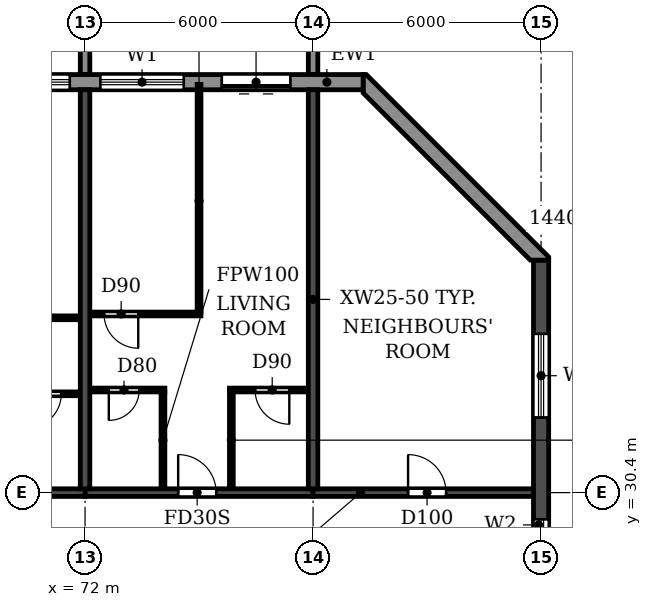
"""IFC4 building model, lengths in metres.
Left out: names, types, materials, properties, quantities, classifications, styles, units other than length and angle.
Written with IfcOpenShell. Run it as: python <this file> out.ifc"""

import sys

from ifc_helpers import new_model, si_unit, direction, frame, frame_2d, origin, place, context, subcontext, project, spatial, polyline, rectangle, outline, extrude, source, transform, mapped, element, fill, save


model = new_model("IFC4")
c1 = context("Model", 3, precision=1e-05, world=origin(), true_north=direction((0.0, 1.0)))
c2 = subcontext(c1, "Body", "Model", "MODEL_VIEW")
j1 = project(units=[si_unit("LENGTHUNIT", "METRE"), si_unit("PLANEANGLEUNIT", "RADIAN")], contexts=[c1])
p1 = place(None, origin())
s1 = spatial("IfcSite", under=j1, at=p1, CompositionType="ELEMENT")
p2 = place(p1, origin())
s2 = spatial("IfcBuilding", under=s1, at=p2, CompositionType="ELEMENT")
p3 = place(p2, frame((0.0, 0.0, 175.2)))
s3 = spatial("IfcBuildingStorey", under=s2, at=p3, CompositionType="ELEMENT", Elevation=175.2)
for number, where, z_axis, x_axis in (
    (1, (72.0, 30.5, 0.0), (0.0, 0.0, 1.0), (0.0, 1.0, 0.0)),
    (2, (78.0, 30.5, 0.0), (0.0, 0.0, 1.0), (0.0, 1.0, 0.0)),
):
    element("IfcWall", number, at=place(p3, frame(where, z_axis=z_axis, x_axis=x_axis)), inside=s3, PredefinedType="SHEAR", context=c2, shape_type="SweptSolid", body=[
        extrude(rectangle(XDim=10.5, YDim=0.25, at=frame_2d((5.25, 0.0))), origin(), (0.0, 0.0, 1.0), 3.08),
    ])
p4 = place(p3, frame((84.0, 4.683, 0.0), z_axis=(0.0, 0.0, 1.0), x_axis=(0.0, 1.0, 0.0)))
e3 = element("IfcWall", 3, at=p4, inside=s3, PredefinedType="SHEAR", context=c2, shape_type="SweptSolid", body=[
    extrude(rectangle(XDim=31.834, YDim=0.4, at=frame_2d((15.917, 0.0))), origin(), (0.0, 0.0, 1.0), 3.08),
])
p5 = place(p4, frame((23.817, 0.0, 0.9)))
e4 = element("IfcOpeningElement", 4, at=p5, cuts=e3, PredefinedType="OPENING", context=c2, shape_type="SweptSolid", body=[
    extrude(rectangle(XDim=1.2, YDim=1.5, at=frame_2d((0.6, 0.75))), frame((0.0, 0.21, 0.0), z_axis=(0.0, -1.0, 0.0), x_axis=(1.0, 0.0, 0.0)), (0.0, 0.0, 1.0), 0.42),
])
p6 = place(p4, frame((8.017, 0.0, 0.9)))
e5 = element("IfcOpeningElement", 5, at=p6, cuts=e3, PredefinedType="OPENING", context=c2, shape_type="SweptSolid", body=[
    extrude(rectangle(XDim=1.2, YDim=1.5, at=frame_2d((0.6, 0.75))), frame((0.0, 0.21, 0.0), z_axis=(0.0, -1.0, 0.0), x_axis=(1.0, 0.0, 0.0)), (0.0, 0.0, 1.0), 0.42),
])
p7 = place(p4, frame((27.694, 0.0, 0.6)))
e6 = element("IfcOpeningElement", 6, at=p7, cuts=e3, PredefinedType="OPENING", context=c2, shape_type="SweptSolid", body=[
    extrude(rectangle(XDim=2.2, YDim=1.8, at=frame_2d((1.1, 0.9))), frame((0.0, 0.21, 0.0), z_axis=(0.0, -1.0, 0.0), x_axis=(1.0, 0.0, 0.0)), (0.0, 0.0, 1.0), 0.42),
])
p8 = place(p4, frame((2.541, 0.0, 0.6)))
e7 = element("IfcOpeningElement", 7, at=p8, cuts=e3, PredefinedType="OPENING", context=c2, shape_type="SweptSolid", body=[
    extrude(rectangle(XDim=2.2, YDim=1.8, at=frame_2d((1.1, 0.9))), frame((0.0, 0.21, 0.0), z_axis=(0.0, -1.0, 0.0), x_axis=(1.0, 0.0, 0.0)), (0.0, 0.0, 1.0), 0.42),
])
p9 = place(p4, frame((15.917, 0.0, 0.9)))
e8 = element("IfcOpeningElement", 8, at=p9, cuts=e3, PredefinedType="OPENING", context=c2, shape_type="SweptSolid", body=[
    extrude(rectangle(XDim=1.2, YDim=1.5, at=frame_2d((0.6, 0.75))), frame((0.0, 0.21, 0.0), z_axis=(0.0, -1.0, 0.0), x_axis=(1.0, 0.0, 0.0)), (0.0, 0.0, 1.0), 0.42),
])
p10 = place(p3, frame((66.0, 30.4, 0.0), z_axis=(0.0, 0.0, 1.0), x_axis=(1.0, 0.0, 0.0)))
e9 = element("IfcWall", 9, at=p10, inside=s3, PredefinedType="SHEAR", context=c2, shape_type="SweptSolid", body=[
    extrude(rectangle(XDim=6.0, YDim=0.2, at=frame_2d((3.0, 0.0))), origin(), (0.0, 0.0, 1.0), 2.48),
])
p11 = place(p10, frame((2.45, 0.0, 0.0)))
e10 = element("IfcOpeningElement", 10, at=p11, cuts=e9, PredefinedType="OPENING", context=c2, shape_type="SweptSolid", body=[
    extrude(rectangle(XDim=1.0, YDim=2.1, at=frame_2d((0.5, 1.05))), frame((0.0, 0.11, 0.0), z_axis=(0.0, -1.0, 0.0), x_axis=(1.0, 0.0, 0.0)), (0.0, 0.0, 1.0), 0.22),
])
p12 = place(p3, frame((72.0, 30.4, 0.0), z_axis=(0.0, 0.0, 1.0), x_axis=(1.0, 0.0, 0.0)))
e11 = element("IfcWall", 11, at=p12, inside=s3, PredefinedType="SHEAR", context=c2, shape_type="SweptSolid", body=[
    extrude(rectangle(XDim=6.0, YDim=0.2, at=frame_2d((3.0, 0.0))), origin(), (0.0, 0.0, 1.0), 2.48),
])
p13 = place(p12, frame((2.45, 0.0, 0.0)))
e12 = element("IfcOpeningElement", 12, at=p13, cuts=e11, PredefinedType="OPENING", context=c2, shape_type="SweptSolid", body=[
    extrude(rectangle(XDim=1.0, YDim=2.1, at=frame_2d((0.5, 1.05))), frame((0.0, 0.11, 0.0), z_axis=(0.0, -1.0, 0.0), x_axis=(1.0, 0.0, 0.0)), (0.0, 0.0, 1.0), 0.22),
])
p14 = place(p3, frame((78.0, 30.4, 0.0), z_axis=(0.0, 0.0, 1.0), x_axis=(1.0, 0.0, 0.0)))
e13 = element("IfcWall", 13, at=p14, inside=s3, PredefinedType="SHEAR", context=c2, shape_type="SweptSolid", body=[
    extrude(rectangle(XDim=5.8, YDim=0.2, at=frame_2d((2.9, 0.0))), origin(), (0.0, 0.0, 1.0), 2.48),
])
p15 = place(p14, frame((2.5, 0.0, 0.0)))
e14 = element("IfcOpeningElement", 14, at=p15, cuts=e13, PredefinedType="OPENING", context=c2, shape_type="SweptSolid", body=[
    extrude(rectangle(XDim=1.0, YDim=2.1, at=frame_2d((0.5, 1.05))), frame((0.0, 0.11, 0.0), z_axis=(0.0, -1.0, 0.0), x_axis=(1.0, 0.0, 0.0)), (0.0, 0.0, 1.0), 0.22),
])
p16 = place(p3, origin())
e15 = element("IfcWall", 15, at=p16, inside=s3, PredefinedType="STANDARD", context=c2, shape_type="SweptSolid", body=[
    extrude(outline(polyline([(84.2, 36.517), (84.2, 36.6), (79.4, 41.4), (79.317, 41.4), (79.317, 40.917), (83.717, 36.517), (84.2, 36.517)])), origin(), (0.0, 0.0, 1.0), 3.08),
])
p17 = place(p3, frame((79.317, 41.2, 0.0), z_axis=(0.0, 0.0, 1.0), x_axis=(-1.0, 0.0, 0.0)))
e16 = element("IfcWall", 16, at=p17, inside=s3, PredefinedType="STANDARD", context=c2, shape_type="SweptSolid", body=[
    extrude(rectangle(XDim=56.634, YDim=0.4, at=frame_2d((28.317, 0.0))), origin(), (0.0, 0.0, 1.0), 3.08),
])
p18 = place(p17, frame((52.717, 0.0, 0.9)))
e17 = element("IfcOpeningElement", 17, at=p18, cuts=e16, PredefinedType="OPENING", context=c2, shape_type="SweptSolid", body=[
    extrude(rectangle(XDim=2.2, YDim=1.5, at=frame_2d((1.1, 0.75))), frame((0.0, 0.21, 0.0), z_axis=(0.0, -1.0, 0.0), x_axis=(1.0, 0.0, 0.0)), (0.0, 0.0, 1.0), 0.42),
])
p19 = place(p17, frame((49.917, 0.0, 0.0)))
e18 = element("IfcOpeningElement", 18, at=p19, cuts=e16, PredefinedType="OPENING", context=c2, shape_type="SweptSolid", body=[
    extrude(rectangle(XDim=1.8, YDim=2.4, at=frame_2d((0.9, 1.2))), frame((0.0, 0.21, 0.0), z_axis=(0.0, -1.0, 0.0), x_axis=(1.0, 0.0, 0.0)), (0.0, 0.0, 1.0), 0.42),
])
p20 = place(p17, frame((46.717, 0.0, 0.9)))
e19 = element("IfcOpeningElement", 19, at=p20, cuts=e16, PredefinedType="OPENING", context=c2, shape_type="SweptSolid", body=[
    extrude(rectangle(XDim=2.2, YDim=1.5, at=frame_2d((1.1, 0.75))), frame((0.0, 0.21, 0.0), z_axis=(0.0, -1.0, 0.0), x_axis=(1.0, 0.0, 0.0)), (0.0, 0.0, 1.0), 0.42),
])
p21 = place(p17, frame((43.717, 0.0, 0.9)))
e20 = element("IfcOpeningElement", 20, at=p21, cuts=e16, PredefinedType="OPENING", context=c2, shape_type="SweptSolid", body=[
    extrude(rectangle(XDim=2.2, YDim=1.5, at=frame_2d((1.1, 0.75))), frame((0.0, 0.21, 0.0), z_axis=(0.0, -1.0, 0.0), x_axis=(1.0, 0.0, 0.0)), (0.0, 0.0, 1.0), 0.42),
])
p22 = place(p17, frame((40.917, 0.0, 0.0)))
e21 = element("IfcOpeningElement", 21, at=p22, cuts=e16, PredefinedType="OPENING", context=c2, shape_type="SweptSolid", body=[
    extrude(rectangle(XDim=1.8, YDim=2.4, at=frame_2d((0.9, 1.2))), frame((0.0, 0.21, 0.0), z_axis=(0.0, -1.0, 0.0), x_axis=(1.0, 0.0, 0.0)), (0.0, 0.0, 1.0), 0.42),
])
p23 = place(p17, frame((37.717, 0.0, 0.9)))
e22 = element("IfcOpeningElement", 22, at=p23, cuts=e16, PredefinedType="OPENING", context=c2, shape_type="SweptSolid", body=[
    extrude(rectangle(XDim=2.2, YDim=1.5, at=frame_2d((1.1, 0.75))), frame((0.0, 0.21, 0.0), z_axis=(0.0, -1.0, 0.0), x_axis=(1.0, 0.0, 0.0)), (0.0, 0.0, 1.0), 0.42),
])
p24 = place(p17, frame((34.717, 0.0, 0.9)))
e23 = element("IfcOpeningElement", 23, at=p24, cuts=e16, PredefinedType="OPENING", context=c2, shape_type="SweptSolid", body=[
    extrude(rectangle(XDim=2.2, YDim=1.5, at=frame_2d((1.1, 0.75))), frame((0.0, 0.21, 0.0), z_axis=(0.0, -1.0, 0.0), x_axis=(1.0, 0.0, 0.0)), (0.0, 0.0, 1.0), 0.42),
])
p25 = place(p17, frame((31.717, 0.0, 0.9)))
e24 = element("IfcOpeningElement", 24, at=p25, cuts=e16, PredefinedType="OPENING", context=c2, shape_type="SweptSolid", body=[
    extrude(rectangle(XDim=2.2, YDim=1.5, at=frame_2d((1.1, 0.75))), frame((0.0, 0.21, 0.0), z_axis=(0.0, -1.0, 0.0), x_axis=(1.0, 0.0, 0.0)), (0.0, 0.0, 1.0), 0.42),
])
p26 = place(p17, frame((28.717, 0.0, 0.9)))
e25 = element("IfcOpeningElement", 25, at=p26, cuts=e16, PredefinedType="OPENING", context=c2, shape_type="SweptSolid", body=[
    extrude(rectangle(XDim=2.2, YDim=1.5, at=frame_2d((1.1, 0.75))), frame((0.0, 0.21, 0.0), z_axis=(0.0, -1.0, 0.0), x_axis=(1.0, 0.0, 0.0)), (0.0, 0.0, 1.0), 0.42),
])
p27 = place(p17, frame((25.917, 0.0, 0.0)))
e26 = element("IfcOpeningElement", 26, at=p27, cuts=e16, PredefinedType="OPENING", context=c2, shape_type="SweptSolid", body=[
    extrude(rectangle(XDim=1.8, YDim=2.4, at=frame_2d((0.9, 1.2))), frame((0.0, 0.21, 0.0), z_axis=(0.0, -1.0, 0.0), x_axis=(1.0, 0.0, 0.0)), (0.0, 0.0, 1.0), 0.42),
])
p28 = place(p17, frame((22.717, 0.0, 0.9)))
e27 = element("IfcOpeningElement", 27, at=p28, cuts=e16, PredefinedType="OPENING", context=c2, shape_type="SweptSolid", body=[
    extrude(rectangle(XDim=2.2, YDim=1.5, at=frame_2d((1.1, 0.75))), frame((0.0, 0.21, 0.0), z_axis=(0.0, -1.0, 0.0), x_axis=(1.0, 0.0, 0.0)), (0.0, 0.0, 1.0), 0.42),
])
p29 = place(p17, frame((19.917, 0.0, 0.0)))
e28 = element("IfcOpeningElement", 28, at=p29, cuts=e16, PredefinedType="OPENING", context=c2, shape_type="SweptSolid", body=[
    extrude(rectangle(XDim=1.8, YDim=2.4, at=frame_2d((0.9, 1.2))), frame((0.0, 0.21, 0.0), z_axis=(0.0, -1.0, 0.0), x_axis=(1.0, 0.0, 0.0)), (0.0, 0.0, 1.0), 0.42),
])
p30 = place(p17, frame((16.717, 0.0, 0.9)))
e29 = element("IfcOpeningElement", 29, at=p30, cuts=e16, PredefinedType="OPENING", context=c2, shape_type="SweptSolid", body=[
    extrude(rectangle(XDim=2.2, YDim=1.5, at=frame_2d((1.1, 0.75))), frame((0.0, 0.21, 0.0), z_axis=(0.0, -1.0, 0.0), x_axis=(1.0, 0.0, 0.0)), (0.0, 0.0, 1.0), 0.42),
])
p31 = place(p17, frame((13.717, 0.0, 0.9)))
e30 = element("IfcOpeningElement", 30, at=p31, cuts=e16, PredefinedType="OPENING", context=c2, shape_type="SweptSolid", body=[
    extrude(rectangle(XDim=2.2, YDim=1.5, at=frame_2d((1.1, 0.75))), frame((0.0, 0.21, 0.0), z_axis=(0.0, -1.0, 0.0), x_axis=(1.0, 0.0, 0.0)), (0.0, 0.0, 1.0), 0.42),
])
p32 = place(p17, frame((10.917, 0.0, 0.0)))
e31 = element("IfcOpeningElement", 31, at=p32, cuts=e16, PredefinedType="OPENING", context=c2, shape_type="SweptSolid", body=[
    extrude(rectangle(XDim=1.8, YDim=2.4, at=frame_2d((0.9, 1.2))), frame((0.0, 0.21, 0.0), z_axis=(0.0, -1.0, 0.0), x_axis=(1.0, 0.0, 0.0)), (0.0, 0.0, 1.0), 0.42),
])
p33 = place(p17, frame((7.717, 0.0, 0.9)))
e32 = element("IfcOpeningElement", 32, at=p33, cuts=e16, PredefinedType="OPENING", context=c2, shape_type="SweptSolid", body=[
    extrude(rectangle(XDim=2.2, YDim=1.5, at=frame_2d((1.1, 0.75))), frame((0.0, 0.21, 0.0), z_axis=(0.0, -1.0, 0.0), x_axis=(1.0, 0.0, 0.0)), (0.0, 0.0, 1.0), 0.42),
])
p34 = place(p17, frame((4.717, 0.0, 0.9)))
e33 = element("IfcOpeningElement", 33, at=p34, cuts=e16, PredefinedType="OPENING", context=c2, shape_type="SweptSolid", body=[
    extrude(rectangle(XDim=2.2, YDim=1.5, at=frame_2d((1.1, 0.75))), frame((0.0, 0.21, 0.0), z_axis=(0.0, -1.0, 0.0), x_axis=(1.0, 0.0, 0.0)), (0.0, 0.0, 1.0), 0.42),
])
p35 = place(p17, frame((1.917, 0.0, 0.0)))
e34 = element("IfcOpeningElement", 34, at=p35, cuts=e16, PredefinedType="OPENING", context=c2, shape_type="SweptSolid", body=[
    extrude(rectangle(XDim=1.8, YDim=2.4, at=frame_2d((0.9, 1.2))), frame((0.0, 0.21, 0.0), z_axis=(0.0, -1.0, 0.0), x_axis=(1.0, 0.0, 0.0)), (0.0, 0.0, 1.0), 0.42),
])
m1 = source(origin(), c2, "Body", "SweptSolid", [
    extrude(outline(polyline([(0.0, 0.0), (0.25, 0.0), (0.25, 3.1), (0.0, 3.1), (0.0, 0.0)])), origin(), (0.0, 0.0, 1.0), 3.1),
])
for number, where in (
    (35, (71.875, 41.4, 0.0)),
    (36, (77.875, 41.4, 0.0)),
):
    element("IfcWall", number, at=place(p3, frame(where)), inside=s3, PredefinedType="STANDARD", context=c2, shape_type="MappedRepresentation", body=[
        mapped(m1, transform((0.0, 0.0, 0.0))),
    ])
p36 = place(p3, frame((69.8, 33.0, 0.0), z_axis=(0.0, 0.0, 1.0), x_axis=(1.0, 0.0, 0.0)))
e37 = element("IfcWall", 37, at=p36, inside=s3, PredefinedType="PARTITIONING", context=c2, shape_type="SweptSolid", body=[
    extrude(rectangle(XDim=2.065, YDim=0.1, at=frame_2d((1.032, 0.0))), origin(), (0.0, 0.0, 1.0), 3.08),
])
p37 = place(p36, frame((0.675, 0.0, 0.0)))
e38 = element("IfcOpeningElement", 38, at=p37, cuts=e37, PredefinedType="OPENING", context=c2, shape_type="SweptSolid", body=[
    extrude(rectangle(XDim=0.9, YDim=2.1, at=frame_2d((0.45, 1.05))), frame((0.0, 0.06, 0.0), z_axis=(0.0, -1.0, 0.0), x_axis=(1.0, 0.0, 0.0)), (0.0, 0.0, 1.0), 0.12),
])
p38 = place(p3, frame((72.135, 33.1, 0.0), z_axis=(0.0, 0.0, 1.0), x_axis=(1.0, 0.0, 0.0)))
e39 = element("IfcWall", 39, at=p38, inside=s3, PredefinedType="PARTITIONING", context=c2, shape_type="SweptSolid", body=[
    extrude(rectangle(XDim=1.965, YDim=0.1, at=frame_2d((0.982, 0.0))), origin(), (0.0, 0.0, 1.0), 3.08),
])
p39 = place(p38, frame((0.49, 0.0, 0.0)))
e40 = element("IfcOpeningElement", 40, at=p39, cuts=e39, PredefinedType="OPENING", context=c2, shape_type="SweptSolid", body=[
    extrude(rectangle(XDim=0.8, YDim=2.1, at=frame_2d((0.4, 1.05))), frame((0.0, 0.06, 0.0), z_axis=(0.0, -1.0, 0.0), x_axis=(1.0, 0.0, 0.0)), (0.0, 0.0, 1.0), 0.12),
])
p40 = place(p3, frame((75.8, 33.1, 0.0), z_axis=(0.0, 0.0, 1.0), x_axis=(1.0, 0.0, 0.0)))
e41 = element("IfcWall", 41, at=p40, inside=s3, PredefinedType="PARTITIONING", context=c2, shape_type="SweptSolid", body=[
    extrude(rectangle(XDim=2.065, YDim=0.1, at=frame_2d((1.032, 0.0))), origin(), (0.0, 0.0, 1.0), 3.08),
])
p41 = place(p40, frame((0.675, 0.0, 0.0)))
e42 = element("IfcOpeningElement", 42, at=p41, cuts=e41, PredefinedType="OPENING", context=c2, shape_type="SweptSolid", body=[
    extrude(rectangle(XDim=0.9, YDim=2.1, at=frame_2d((0.45, 1.05))), frame((0.0, 0.06, 0.0), z_axis=(0.0, -1.0, 0.0), x_axis=(1.0, 0.0, 0.0)), (0.0, 0.0, 1.0), 0.12),
])
p42 = place(p3, frame((68.95, 35.0, 0.0), z_axis=(0.0, 0.0, 1.0), x_axis=(1.0, 0.0, 0.0)))
e43 = element("IfcWall", 43, at=p42, inside=s3, PredefinedType="PARTITIONING", context=c2, shape_type="SweptSolid", body=[
    extrude(rectangle(XDim=2.915, YDim=0.1, at=frame_2d((1.458, 0.0))), origin(), (0.0, 0.0, 1.0), 3.08),
])
p43 = place(p42, frame((0.55, 0.0, 0.0)))
e44 = element("IfcOpeningElement", 44, at=p43, cuts=e43, PredefinedType="OPENING", context=c2, shape_type="SweptSolid", body=[
    extrude(rectangle(XDim=0.9, YDim=2.1, at=frame_2d((0.45, 1.05))), frame((0.0, 0.06, 0.0), z_axis=(0.0, -1.0, 0.0), x_axis=(1.0, 0.0, 0.0)), (0.0, 0.0, 1.0), 0.12),
])
p44 = place(p3, frame((72.135, 35.1, 0.0), z_axis=(0.0, 0.0, 1.0), x_axis=(1.0, 0.0, 0.0)))
e45 = element("IfcWall", 45, at=p44, inside=s3, PredefinedType="PARTITIONING", context=c2, shape_type="SweptSolid", body=[
    extrude(rectangle(XDim=2.915, YDim=0.1, at=frame_2d((1.458, 0.0))), origin(), (0.0, 0.0, 1.0), 3.08),
])
p45 = place(p44, frame((0.365, 0.0, 0.0)))
e46 = element("IfcOpeningElement", 46, at=p45, cuts=e45, PredefinedType="OPENING", context=c2, shape_type="SweptSolid", body=[
    extrude(rectangle(XDim=0.9, YDim=2.1, at=frame_2d((0.45, 1.05))), frame((0.0, 0.06, 0.0), z_axis=(0.0, -1.0, 0.0), x_axis=(1.0, 0.0, 0.0)), (0.0, 0.0, 1.0), 0.12),
])
p46 = place(p3, frame((74.05, 30.51, 0.0), z_axis=(0.0, 0.0, 1.0), x_axis=(0.0, 1.0, 0.0)))
e47 = element("IfcWall", 47, at=p46, inside=s3, PredefinedType="PARTITIONING", context=c2, shape_type="SweptSolid", body=[
    extrude(rectangle(XDim=2.54, YDim=0.1, at=frame_2d((1.27, 0.0))), origin(), (0.0, 0.0, 1.0), 3.08),
])
p47 = place(p3, frame((75.0, 35.15, 0.0), z_axis=(0.0, 0.0, 1.0), x_axis=(0.0, 1.0, 0.0)))
e48 = element("IfcWall", 48, at=p47, inside=s3, PredefinedType="PARTITIONING", context=c2, shape_type="SweptSolid", body=[
    extrude(rectangle(XDim=5.99, YDim=0.1, at=frame_2d((2.995, 0.0))), origin(), (0.0, 0.0, 1.0), 3.08),
])
p48 = place(p3, frame((75.85, 30.51, 0.0), z_axis=(0.0, 0.0, 1.0), x_axis=(0.0, 1.0, 0.0)))
e49 = element("IfcWall", 49, at=p48, inside=s3, PredefinedType="PARTITIONING", context=c2, shape_type="SweptSolid", body=[
    extrude(rectangle(XDim=2.54, YDim=0.1, at=frame_2d((1.27, 0.0))), origin(), (0.0, 0.0, 1.0), 3.08),
])
p49 = place(p5, origin())
e50 = element("IfcWindow", 50, at=p49, inside=s3, PartitioningType="SINGLE_PANEL", PredefinedType="WINDOW", context=c2, shape_type="SweptSolid", body=[
    extrude(rectangle(XDim=1.2, YDim=1.5, at=frame_2d((0.6, 0.75))), frame((0.0, 0.03, 0.0), z_axis=(0.0, -1.0, 0.0), x_axis=(1.0, 0.0, 0.0)), (0.0, 0.0, 1.0), 0.06),
])
fill(e4, e50)
p50 = place(p7, origin())
e51 = element("IfcWindow", 51, at=p50, inside=s3, PartitioningType="DOUBLE_PANEL_HORIZONTAL", PredefinedType="WINDOW", context=c2, shape_type="SweptSolid", body=[
    extrude(rectangle(XDim=2.2, YDim=1.8, at=frame_2d((1.1, 0.9))), frame((0.0, 0.03, 0.0), z_axis=(0.0, -1.0, 0.0), x_axis=(1.0, 0.0, 0.0)), (0.0, 0.0, 1.0), 0.06),
])
fill(e6, e51)
p51 = place(p33, origin())
e52 = element("IfcWindow", 52, at=p51, inside=s3, PartitioningType="DOUBLE_PANEL_HORIZONTAL", PredefinedType="WINDOW", context=c2, shape_type="SweptSolid", body=[
    extrude(rectangle(XDim=2.2, YDim=1.5, at=frame_2d((1.1, 0.75))), frame((0.0, 0.03, 0.0), z_axis=(0.0, -1.0, 0.0), x_axis=(1.0, 0.0, 0.0)), (0.0, 0.0, 1.0), 0.06),
])
fill(e32, e52)
p52 = place(p34, origin())
e53 = element("IfcWindow", 53, at=p52, inside=s3, PartitioningType="DOUBLE_PANEL_HORIZONTAL", PredefinedType="WINDOW", context=c2, shape_type="SweptSolid", body=[
    extrude(rectangle(XDim=2.2, YDim=1.5, at=frame_2d((1.1, 0.75))), frame((0.0, 0.03, 0.0), z_axis=(0.0, -1.0, 0.0), x_axis=(1.0, 0.0, 0.0)), (0.0, 0.0, 1.0), 0.06),
])
fill(e33, e53)
p53 = place(p35, origin())
e54 = element("IfcDoor", 54, at=p53, inside=s3, OperationType="DOUBLE_DOOR_SLIDING", PredefinedType="DOOR", context=c2, shape_type="SweptSolid", body=[
    extrude(rectangle(XDim=1.8, YDim=2.4, at=frame_2d((0.9, 1.2))), frame((0.0, 0.025, 0.0), z_axis=(0.0, -1.0, 0.0), x_axis=(1.0, 0.0, 0.0)), (0.0, 0.0, 1.0), 0.05),
])
fill(e34, e54)
p54 = place(p37, frame((0.9, 0.0, 0.0), z_axis=(0.0, 0.0, 1.0), x_axis=(-1.0, 0.0, 0.0)))
e55 = element("IfcDoor", 55, at=p54, inside=s3, OperationType="SINGLE_SWING_RIGHT", PredefinedType="DOOR", context=c2, shape_type="SweptSolid", body=[
    extrude(rectangle(XDim=0.9, YDim=2.1, at=frame_2d((0.45, 1.05))), frame((0.0, 0.025, 0.0), z_axis=(0.0, -1.0, 0.0), x_axis=(1.0, 0.0, 0.0)), (0.0, 0.0, 1.0), 0.05),
])
fill(e38, e55)
p55 = place(p45, frame((0.9, 0.0, 0.0), z_axis=(0.0, 0.0, 1.0), x_axis=(-1.0, 0.0, 0.0)))
e56 = element("IfcDoor", 56, at=p55, inside=s3, OperationType="SINGLE_SWING_LEFT", PredefinedType="DOOR", context=c2, shape_type="SweptSolid", body=[
    extrude(rectangle(XDim=0.9, YDim=2.1, at=frame_2d((0.45, 1.05))), frame((0.0, 0.025, 0.0), z_axis=(0.0, -1.0, 0.0), x_axis=(1.0, 0.0, 0.0)), (0.0, 0.0, 1.0), 0.05),
])
fill(e46, e56)
p56 = place(p39, frame((0.8, 0.0, 0.0), z_axis=(0.0, 0.0, 1.0), x_axis=(-1.0, 0.0, 0.0)))
e57 = element("IfcDoor", 57, at=p56, inside=s3, OperationType="SINGLE_SWING_RIGHT", PredefinedType="DOOR", context=c2, shape_type="SweptSolid", body=[
    extrude(rectangle(XDim=0.8, YDim=2.1, at=frame_2d((0.4, 1.05))), frame((0.0, 0.025, 0.0), z_axis=(0.0, -1.0, 0.0), x_axis=(1.0, 0.0, 0.0)), (0.0, 0.0, 1.0), 0.05),
])
fill(e40, e57)
p57 = place(p13, origin())
e58 = element("IfcDoor", 58, at=p57, inside=s3, OperationType="SINGLE_SWING_LEFT", PredefinedType="DOOR", context=c2, shape_type="SweptSolid", body=[
    extrude(rectangle(XDim=1.0, YDim=2.1, at=frame_2d((0.5, 1.05))), frame((0.0, 0.025, 0.0), z_axis=(0.0, -1.0, 0.0), x_axis=(1.0, 0.0, 0.0)), (0.0, 0.0, 1.0), 0.05),
])
fill(e12, e58)
p58 = place(p41, frame((0.9, 0.0, 0.0), z_axis=(0.0, 0.0, 1.0), x_axis=(-1.0, 0.0, 0.0)))
e59 = element("IfcDoor", 59, at=p58, inside=s3, OperationType="SINGLE_SWING_LEFT", PredefinedType="DOOR", context=c2, shape_type="SweptSolid", body=[
    extrude(rectangle(XDim=0.9, YDim=2.1, at=frame_2d((0.45, 1.05))), frame((0.0, 0.025, 0.0), z_axis=(0.0, -1.0, 0.0), x_axis=(1.0, 0.0, 0.0)), (0.0, 0.0, 1.0), 0.05),
])
fill(e42, e59)
p59 = place(p15, origin())
e60 = element("IfcDoor", 60, at=p59, inside=s3, OperationType="SINGLE_SWING_LEFT", PredefinedType="DOOR", context=c2, shape_type="SweptSolid", body=[
    extrude(rectangle(XDim=1.0, YDim=2.1, at=frame_2d((0.5, 1.05))), frame((0.0, 0.025, 0.0), z_axis=(0.0, -1.0, 0.0), x_axis=(1.0, 0.0, 0.0)), (0.0, 0.0, 1.0), 0.05),
])
fill(e14, e60)
save(model, sys.argv[1])
